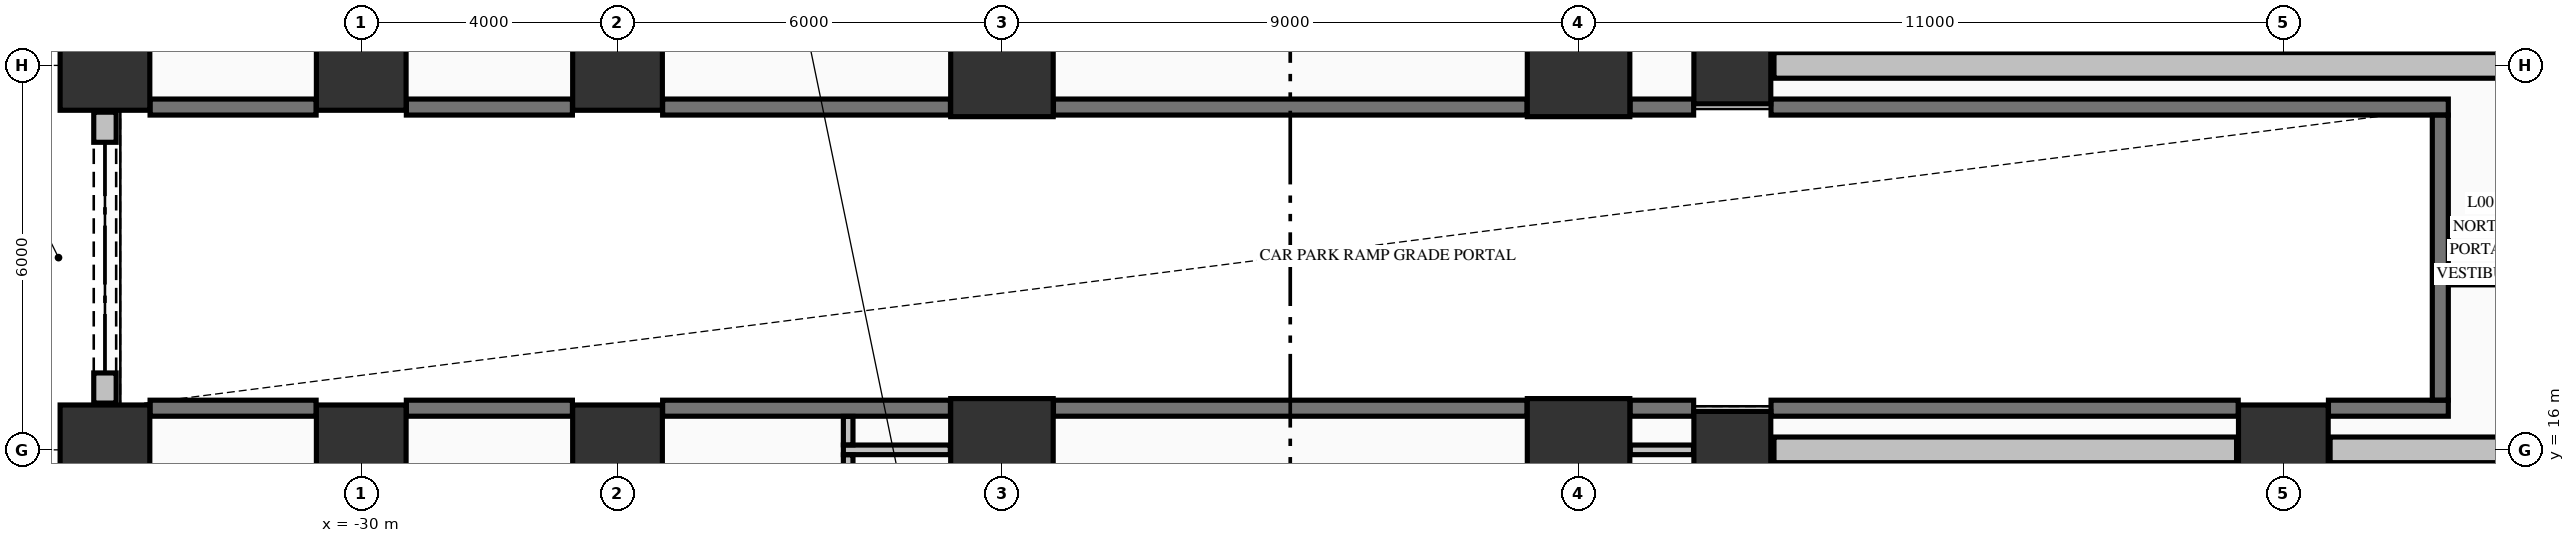
"""IFC4 building model, lengths in metres.
Left out: names, types, materials, properties, quantities, classifications, styles, units other than length and angle.
Written with IfcOpenShell. Run it as: python <this file> out.ifc"""

import sys

from ifc_helpers import new_model, si_unit, direction, frame, frame_2d, origin, origin_2d, place, context, subcontext, project, spatial, rectangle, extrude, element, fill, save


model = new_model("IFC4")
c1 = context("Model", 3, precision=1e-05, world=origin(), true_north=direction((0.0, 1.0)))
c2 = subcontext(c1, "Body", "Model", "MODEL_VIEW")
j1 = project(units=[si_unit("LENGTHUNIT", "METRE"), si_unit("PLANEANGLEUNIT", "RADIAN")], contexts=[c1])
p1 = place(None, origin())
s1 = spatial("IfcSite", under=j1, at=p1, CompositionType="ELEMENT")
p2 = place(p1, origin())
s2 = spatial("IfcBuilding", under=s1, at=p2, CompositionType="ELEMENT")
p3 = place(p2, origin())
s3 = spatial("IfcBuildingStorey", under=s2, at=p3, CompositionType="ELEMENT", Elevation=0.0)
for number, where, z_axis, x_axis in (
    (1, (-34.0, 16.0, 0.0), (0.0, 0.0, 1.0), (1.0, 0.0, 0.0)),
    (2, (-34.0, 22.0, 0.0), (0.0, 0.0, 1.0), (1.0, 0.0, 0.0)),
    (3, (-30.0, 16.0, 0.0), (0.0, 0.0, 1.0), (1.0, 0.0, 0.0)),
    (4, (-30.0, 22.0, 0.0), (0.0, 0.0, 1.0), (1.0, 0.0, 0.0)),
    (5, (-26.0, 16.0, 0.0), (0.0, 0.0, 1.0), (1.0, 0.0, 0.0)),
    (6, (-26.0, 22.0, 0.0), (0.0, 0.0, 1.0), (1.0, 0.0, 0.0)),
):
    element("IfcColumn", number, at=place(p3, frame(where, z_axis=z_axis, x_axis=x_axis)), inside=s3, PredefinedType="COLUMN", context=c2, shape_type="SweptSolid", body=[
        extrude(rectangle(XDim=1.4, YDim=1.4, at=origin_2d()), origin(), (0.0, 0.0, 1.0), 5.09),
    ])
for number, where, z_axis, x_axis in (
    (7, (-20.0, 16.0, 0.0), (0.0, 0.0, 1.0), (1.0, 0.0, 0.0)),
    (8, (-20.0, 22.0, 0.0), (0.0, 0.0, 1.0), (1.0, 0.0, 0.0)),
    (9, (-11.0, 16.0, 0.0), (0.0, 0.0, 1.0), (1.0, 0.0, 0.0)),
    (10, (-11.0, 22.0, 0.0), (0.0, 0.0, 1.0), (1.0, 0.0, 0.0)),
):
    element("IfcColumn", number, at=place(p3, frame(where, z_axis=z_axis, x_axis=x_axis)), inside=s3, PredefinedType="COLUMN", context=c2, shape_type="SweptSolid", body=[
        extrude(rectangle(XDim=1.6, YDim=1.6, at=origin_2d()), origin(), (0.0, 0.0, 1.0), 5.09),
    ])
p4 = place(p3, frame((0.0, 16.0, 0.0), z_axis=(0.0, 0.0, 1.0), x_axis=(1.0, 0.0, 0.0)))
e11 = element("IfcColumn", 11, at=p4, inside=s3, PredefinedType="COLUMN", context=c2, shape_type="SweptSolid", body=[
    extrude(rectangle(XDim=1.4, YDim=1.4, at=origin_2d()), origin(), (0.0, 0.0, 1.0), 5.09),
])
for number, where, z_axis, x_axis in (
    (12, (-8.6, 16.0, 0.0), (0.0, 0.0, 1.0), (1.0, 0.0, 0.0)),
    (13, (-8.6, 22.0, 0.0), (0.0, 0.0, 1.0), (1.0, 0.0, 0.0)),
):
    element("IfcColumn", number, at=place(p3, frame(where, z_axis=z_axis, x_axis=x_axis)), inside=s3, PredefinedType="COLUMN", context=c2, shape_type="SweptSolid", body=[
        extrude(rectangle(XDim=1.2, YDim=1.2, at=origin_2d()), origin(), (0.0, 0.0, 1.0), 5.09),
    ])
p5 = place(p3, frame((-34.0, 16.73, 0.0), z_axis=(0.0, 0.0, 1.0), x_axis=(0.0, 1.0, 0.0)))
e14 = element("IfcWall", 14, at=p5, inside=s3, PredefinedType="STANDARD", context=c2, shape_type="SweptSolid", body=[
    extrude(rectangle(XDim=4.54, YDim=0.35, at=frame_2d((2.27, 0.0))), origin(), (0.0, 0.0, 1.0), 4.482),
])
p6 = place(p5, frame((0.47, 0.0, 0.0)))
e15 = element("IfcOpeningElement", 15, at=p6, cuts=e14, PredefinedType="OPENING", context=c2, shape_type="SweptSolid", body=[
    extrude(rectangle(XDim=3.6, YDim=3.2, at=frame_2d((1.8, 1.6))), frame((0.0, 0.185, 0.0), z_axis=(0.0, -1.0, 0.0), x_axis=(1.0, 0.0, 0.0)), (0.0, 0.0, 1.0), 0.37),
])
for number, where, z_axis, x_axis in (
    (16, (-7.95, 16.0, 0.0), (0.0, 0.0, 1.0), (1.0, 0.0, 0.0)),
    (17, (0.73, 16.0, 0.0), (0.0, 0.0, 1.0), (1.0, 0.0, 0.0)),
):
    element("IfcWall", number, at=place(p3, frame(where, z_axis=z_axis, x_axis=x_axis)), inside=s3, PredefinedType="STANDARD", context=c2, shape_type="SweptSolid", body=[
        extrude(rectangle(XDim=7.22, YDim=0.4, at=frame_2d((3.61, 0.0))), origin(), (0.0, 0.0, 1.0), 4.132),
    ])
p7 = place(p3, frame((7.95, 22.0, 0.0), z_axis=(0.0, 0.0, 1.0), x_axis=(-1.0, 0.0, 0.0)))
e18 = element("IfcWall", 18, at=p7, inside=s3, PredefinedType="STANDARD", context=c2, shape_type="SweptSolid", body=[
    extrude(rectangle(XDim=15.9, YDim=0.4, at=frame_2d((7.95, 0.0))), origin(), (0.0, 0.0, 1.0), 4.132),
])
p8 = place(p7, frame((1.2, 0.0, 0.0)))
e19 = element("IfcOpeningElement", 19, at=p8, cuts=e18, PredefinedType="OPENING", context=c2, shape_type="SweptSolid", body=[
    extrude(rectangle(XDim=2.4, YDim=2.6, at=frame_2d((1.2, 1.3))), frame((0.0, 0.21, 0.0), z_axis=(0.0, -1.0, 0.0), x_axis=(1.0, 0.0, 0.0)), (0.0, 0.0, 1.0), 0.42),
])
for number, where, z_axis, x_axis in (
    (20, (-33.296, 16.65, 0.0), (0.0, 0.0, 1.0), (1.0, 0.0, 0.0)),
    (21, (-29.296, 16.65, 0.0), (0.0, 0.0, 1.0), (1.0, 0.0, 0.0)),
):
    element("IfcWall", number, at=place(p3, frame(where, z_axis=z_axis, x_axis=x_axis)), inside=s3, PredefinedType="SOLIDWALL", context=c2, shape_type="SweptSolid", body=[
        extrude(rectangle(XDim=2.592, YDim=0.25, at=frame_2d((1.296, 0.0))), origin(), (0.0, 0.0, 1.0), 5.09),
    ])
p9 = place(p3, frame((-25.296, 16.65, 0.0), z_axis=(0.0, 0.0, 1.0), x_axis=(1.0, 0.0, 0.0)))
e22 = element("IfcWall", 22, at=p9, inside=s3, PredefinedType="SOLIDWALL", context=c2, shape_type="SweptSolid", body=[
    extrude(rectangle(XDim=4.492, YDim=0.25, at=frame_2d((2.246, 0.0))), origin(), (0.0, 0.0, 1.0), 5.09),
])
p10 = place(p3, frame((-19.196, 16.65, 0.0), z_axis=(0.0, 0.0, 1.0), x_axis=(1.0, 0.0, 0.0)))
e23 = element("IfcWall", 23, at=p10, inside=s3, PredefinedType="SOLIDWALL", context=c2, shape_type="SweptSolid", body=[
    extrude(rectangle(XDim=7.392, YDim=0.25, at=frame_2d((3.696, 0.0))), origin(), (0.0, 0.0, 1.0), 5.09),
])
p11 = place(p3, frame((-10.196, 16.65, 0.0), z_axis=(0.0, 0.0, 1.0), x_axis=(1.0, 0.0, 0.0)))
e24 = element("IfcWall", 24, at=p11, inside=s3, PredefinedType="SOLIDWALL", context=c2, shape_type="SweptSolid", body=[
    extrude(rectangle(XDim=0.992, YDim=0.25, at=frame_2d((0.496, 0.0))), origin(), (0.0, 0.0, 1.0), 5.09),
])
p12 = place(p3, frame((-7.996, 16.65, 0.0), z_axis=(0.0, 0.0, 1.0), x_axis=(1.0, 0.0, 0.0)))
e25 = element("IfcWall", 25, at=p12, inside=s3, PredefinedType="SOLIDWALL", context=c2, shape_type="SweptSolid", body=[
    extrude(rectangle(XDim=7.292, YDim=0.25, at=frame_2d((3.646, 0.0))), origin(), (0.0, 0.0, 1.0), 5.09),
])
p13 = place(p3, frame((0.704, 16.65, 0.0), z_axis=(0.0, 0.0, 1.0), x_axis=(1.0, 0.0, 0.0)))
e26 = element("IfcWall", 26, at=p13, inside=s3, PredefinedType="SOLIDWALL", context=c2, shape_type="SweptSolid", body=[
    extrude(rectangle(XDim=1.871, YDim=0.25, at=frame_2d((0.936, 0.0))), origin(), (0.0, 0.0, 1.0), 5.09),
])
for number, where, z_axis, x_axis in (
    (27, (-33.296, 21.35, 0.0), (0.0, 0.0, 1.0), (1.0, 0.0, 0.0)),
    (28, (-29.296, 21.35, 0.0), (0.0, 0.0, 1.0), (1.0, 0.0, 0.0)),
):
    element("IfcWall", number, at=place(p3, frame(where, z_axis=z_axis, x_axis=x_axis)), inside=s3, PredefinedType="SOLIDWALL", context=c2, shape_type="SweptSolid", body=[
        extrude(rectangle(XDim=2.592, YDim=0.25, at=frame_2d((1.296, 0.0))), origin(), (0.0, 0.0, 1.0), 5.09),
    ])
p14 = place(p3, frame((-25.296, 21.35, 0.0), z_axis=(0.0, 0.0, 1.0), x_axis=(1.0, 0.0, 0.0)))
e29 = element("IfcWall", 29, at=p14, inside=s3, PredefinedType="SOLIDWALL", context=c2, shape_type="SweptSolid", body=[
    extrude(rectangle(XDim=4.492, YDim=0.25, at=frame_2d((2.246, 0.0))), origin(), (0.0, 0.0, 1.0), 5.09),
])
p15 = place(p3, frame((-19.196, 21.35, 0.0), z_axis=(0.0, 0.0, 1.0), x_axis=(1.0, 0.0, 0.0)))
e30 = element("IfcWall", 30, at=p15, inside=s3, PredefinedType="SOLIDWALL", context=c2, shape_type="SweptSolid", body=[
    extrude(rectangle(XDim=7.392, YDim=0.25, at=frame_2d((3.696, 0.0))), origin(), (0.0, 0.0, 1.0), 5.09),
])
p16 = place(p3, frame((-10.196, 21.35, 0.0), z_axis=(0.0, 0.0, 1.0), x_axis=(1.0, 0.0, 0.0)))
e31 = element("IfcWall", 31, at=p16, inside=s3, PredefinedType="SOLIDWALL", context=c2, shape_type="SweptSolid", body=[
    extrude(rectangle(XDim=0.992, YDim=0.25, at=frame_2d((0.496, 0.0))), origin(), (0.0, 0.0, 1.0), 5.09),
])
p17 = place(p3, frame((-7.996, 21.35, 0.0), z_axis=(0.0, 0.0, 1.0), x_axis=(1.0, 0.0, 0.0)))
e32 = element("IfcWall", 32, at=p17, inside=s3, PredefinedType="SOLIDWALL", context=c2, shape_type="SweptSolid", body=[
    extrude(rectangle(XDim=10.571, YDim=0.25, at=frame_2d((5.286, 0.0))), origin(), (0.0, 0.0, 1.0), 5.09),
])
p18 = place(p3, frame((-22.475, 16.0, 0.0), z_axis=(0.0, 0.0, 1.0), x_axis=(1.0, 0.0, 0.0)))
e33 = element("IfcWall", 33, at=p18, inside=s3, PredefinedType="PARTITIONING", context=c2, shape_type="SweptSolid", body=[
    extrude(rectangle(XDim=1.669, YDim=0.15, at=frame_2d((0.834, 0.0))), origin(), (0.0, 0.0, 1.0), 4.132),
])
p19 = place(p3, frame((-10.194, 16.0, 0.0), z_axis=(0.0, 0.0, 1.0), x_axis=(1.0, 0.0, 0.0)))
e34 = element("IfcWall", 34, at=p19, inside=s3, PredefinedType="PARTITIONING", context=c2, shape_type="SweptSolid", body=[
    extrude(rectangle(XDim=0.988, YDim=0.15, at=frame_2d((0.494, 0.0))), origin(), (0.0, 0.0, 1.0), 4.132),
])
p20 = place(p3, frame((2.578, 18.65, 0.0), z_axis=(0.0, 0.0, 1.0), x_axis=(1.0, 0.0, 0.0)))
e35 = element("IfcWall", 35, at=p20, inside=s3, PredefinedType="PARTITIONING", context=c2, shape_type="SweptSolid", body=[
    extrude(rectangle(XDim=27.272, YDim=0.15, at=frame_2d((13.636, 0.0))), origin(), (0.0, 0.0, 1.0), 5.09),
])
p21 = place(p20, frame((2.322, 0.0, 0.0)))
e36 = element("IfcOpeningElement", 36, at=p21, cuts=e35, PredefinedType="OPENING", context=c2, shape_type="SweptSolid", body=[
    extrude(rectangle(XDim=1.2, YDim=2.15, at=frame_2d((0.6, 1.075))), frame((0.0, 0.085, 0.0), z_axis=(0.0, -1.0, 0.0), x_axis=(1.0, 0.0, 0.0)), (0.0, 0.0, 1.0), 0.17),
])
p22 = place(p20, frame((6.747, 0.0, 0.0)))
e37 = element("IfcOpeningElement", 37, at=p22, cuts=e35, PredefinedType="OPENING", context=c2, shape_type="SweptSolid", body=[
    extrude(rectangle(XDim=0.95, YDim=2.15, at=frame_2d((0.475, 1.075))), frame((0.0, 0.085, 0.0), z_axis=(0.0, -1.0, 0.0), x_axis=(1.0, 0.0, 0.0)), (0.0, 0.0, 1.0), 0.17),
])
p23 = place(p20, frame((12.222, 0.0, 0.0)))
e38 = element("IfcOpeningElement", 38, at=p23, cuts=e35, PredefinedType="OPENING", context=c2, shape_type="SweptSolid", body=[
    extrude(rectangle(XDim=1.4, YDim=2.2, at=frame_2d((0.7, 1.1))), frame((0.0, 0.085, 0.0), z_axis=(0.0, -1.0, 0.0), x_axis=(1.0, 0.0, 0.0)), (0.0, 0.0, 1.0), 0.17),
])
p24 = place(p20, frame((19.897, 0.0, 0.0)))
e39 = element("IfcOpeningElement", 39, at=p24, cuts=e35, PredefinedType="OPENING", context=c2, shape_type="SweptSolid", body=[
    extrude(rectangle(XDim=1.05, YDim=2.15, at=frame_2d((0.525, 1.075))), frame((0.0, 0.085, 0.0), z_axis=(0.0, -1.0, 0.0), x_axis=(1.0, 0.0, 0.0)), (0.0, 0.0, 1.0), 0.17),
])
p25 = place(p20, frame((24.897, 0.0, 0.0)))
e40 = element("IfcOpeningElement", 40, at=p25, cuts=e35, PredefinedType="OPENING", context=c2, shape_type="SweptSolid", body=[
    extrude(rectangle(XDim=0.95, YDim=2.15, at=frame_2d((0.475, 1.075))), frame((0.0, 0.085, 0.0), z_axis=(0.0, -1.0, 0.0), x_axis=(1.0, 0.0, 0.0)), (0.0, 0.0, 1.0), 0.17),
])
p26 = place(p3, frame((2.45, 16.777, 0.0), z_axis=(0.0, 0.0, 1.0), x_axis=(0.0, 1.0, 0.0)))
e41 = element("IfcWall", 41, at=p26, inside=s3, PredefinedType="SOLIDWALL", context=c2, shape_type="SweptSolid", body=[
    extrude(rectangle(XDim=4.446, YDim=0.25, at=frame_2d((2.223, 0.0))), origin(), (0.0, 0.0, 1.0), 5.09),
])
p27 = place(p3, frame((-22.4, -0.647, 0.0), z_axis=(0.0, 0.0, 1.0), x_axis=(0.0, 1.0, 0.0)))
e42 = element("IfcWall", 42, at=p27, inside=s3, PredefinedType="PARTITIONING", context=c2, shape_type="SweptSolid", body=[
    extrude(rectangle(XDim=16.569, YDim=0.15, at=frame_2d((8.285, 0.0))), origin(), (0.0, 0.0, 1.0), 5.09),
])
p28 = place(p27, frame((4.547, 0.0, 0.0)))
e43 = element("IfcOpeningElement", 43, at=p28, cuts=e42, PredefinedType="OPENING", context=c2, shape_type="SweptSolid", body=[
    extrude(rectangle(XDim=1.2, YDim=2.15, at=frame_2d((0.6, 1.075))), frame((0.0, 0.085, 0.0), z_axis=(0.0, -1.0, 0.0), x_axis=(1.0, 0.0, 0.0)), (0.0, 0.0, 1.0), 0.17),
])
p29 = place(p27, frame((12.547, 0.0, 0.0)))
e44 = element("IfcOpeningElement", 44, at=p29, cuts=e42, PredefinedType="OPENING", context=c2, shape_type="SweptSolid", body=[
    extrude(rectangle(XDim=1.2, YDim=2.15, at=frame_2d((0.6, 1.075))), frame((0.0, 0.085, 0.0), z_axis=(0.0, -1.0, 0.0), x_axis=(1.0, 0.0, 0.0)), (0.0, 0.0, 1.0), 0.17),
])
p30 = place(p3, frame((-22.4, 16.078, 0.0), z_axis=(0.0, 0.0, 1.0), x_axis=(0.0, 1.0, 0.0)))
e45 = element("IfcWall", 45, at=p30, inside=s3, PredefinedType="PARTITIONING", context=c2, shape_type="SweptSolid", body=[
    extrude(rectangle(XDim=0.444, YDim=0.15, at=frame_2d((0.222, 0.0))), origin(), (0.0, 0.0, 1.0), 5.09),
])
p31 = place(p6, origin())
e46 = element("IfcDoor", 46, at=p31, inside=s3, OperationType="ROLLINGUP", PredefinedType="DOOR", context=c2, shape_type="SweptSolid", body=[
    extrude(rectangle(XDim=3.6, YDim=3.2, at=frame_2d((1.8, 1.6))), frame((0.0, 0.025, 0.0), z_axis=(0.0, -1.0, 0.0), x_axis=(1.0, 0.0, 0.0)), (0.0, 0.0, 1.0), 0.05),
])
fill(e15, e46)
save(model, sys.argv[1])
